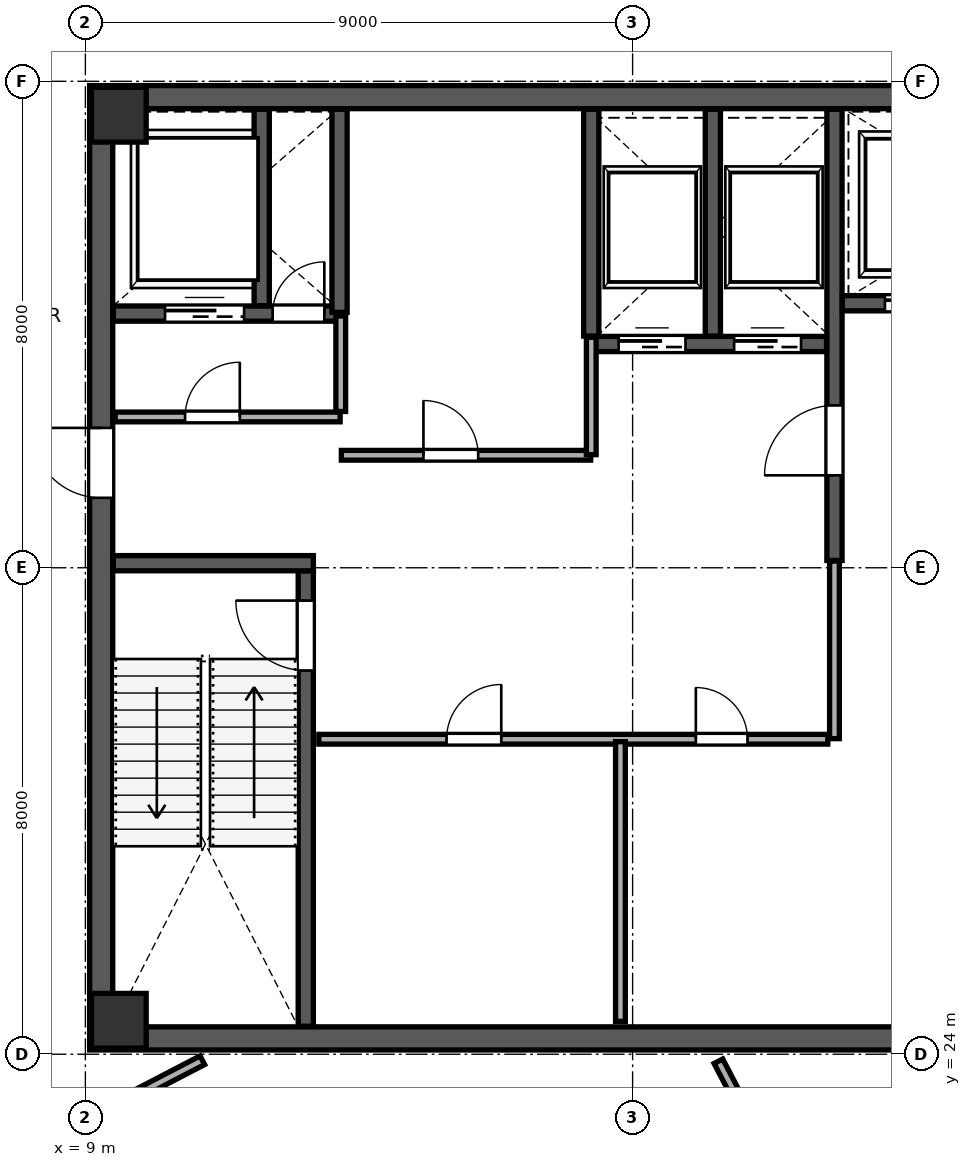
"""IFC4 building model, lengths in metres.
Left out: names, types, materials, properties, quantities, classifications, styles, units other than length and angle.
Written with IfcOpenShell. Run it as: python <this file> out.ifc"""

import sys

from ifc_helpers import new_model, si_unit, direction, frame, frame_2d, origin, origin_2d, place, context, subcontext, project, spatial, rectangle, extrude, source, transform, mapped, element, fill, save


model = new_model("IFC4")
c1 = context("Model", 3, precision=1e-05, world=origin(), true_north=direction((0.0, 1.0)))
c2 = subcontext(c1, "Body", "Model", "MODEL_VIEW")
j1 = project(units=[si_unit("LENGTHUNIT", "METRE"), si_unit("PLANEANGLEUNIT", "RADIAN")], contexts=[c1])
p1 = place(None, origin())
s1 = spatial("IfcSite", under=j1, at=p1, CompositionType="ELEMENT")
p2 = place(p1, origin())
s2 = spatial("IfcBuilding", under=s1, at=p2, CompositionType="ELEMENT")
p3 = place(p2, frame((0.0, 0.0, 328.2)))
s3 = spatial("IfcBuildingStorey", under=s2, at=p3, CompositionType="ELEMENT", Elevation=328.2)
m1 = source(origin(), c2, "Body", "SweptSolid", [
    extrude(rectangle(XDim=0.9, YDim=0.9, at=origin_2d()), origin(), (0.0, 0.0, 1.0), 4.198),
])
for number, where, z_axis, x_axis in (
    (1, (9.55, 24.55, 0.001), (0.0, 0.0, 1.0), (1.0, 0.0, 0.0)),
    (2, (9.55, 39.45, 0.001), (0.0, 0.0, 1.0), (1.0, 0.0, 0.0)),
):
    element("IfcColumn", number, at=place(p3, frame(where, z_axis=z_axis, x_axis=x_axis)), inside=s3, PredefinedType="COLUMN", context=c2, shape_type="MappedRepresentation", body=[
        mapped(m1, transform((0.0, 0.0, 0.0), scale=1.0)),
    ])
p4 = place(p3, frame((9.26, 24.45, 0.0), z_axis=(0.0, 0.0, 1.0), x_axis=(0.0, 1.0, 0.0)))
e3 = element("IfcWall", 3, at=p4, inside=s3, PredefinedType="SHEAR", context=c2, shape_type="SweptSolid", body=[
    extrude(rectangle(XDim=15.1, YDim=0.38, at=frame_2d((7.55, 0.0))), origin(), (0.0, 0.0, 1.0), 3.96),
])
p5 = place(p4, frame((8.7, 0.0, 0.0)))
e4 = element("IfcOpeningElement", 4, at=p5, cuts=e3, PredefinedType="OPENING", context=c2, shape_type="SweptSolid", body=[
    extrude(rectangle(XDim=1.15, YDim=2.2, at=frame_2d((0.575, 1.1))), frame((0.0, 0.2, 0.0), z_axis=(0.0, -1.0, 0.0), x_axis=(1.0, 0.0, 0.0)), (0.0, 0.0, 1.0), 0.4),
])
for number, where, z_axis, x_axis in (
    (5, (9.07, 24.26, 0.0), (0.0, 0.0, 1.0), (1.0, 0.0, 0.0)),
    (6, (9.07, 39.74, 0.0), (0.0, 0.0, 1.0), (1.0, 0.0, 0.0)),
):
    element("IfcWall", number, at=place(p3, frame(where, z_axis=z_axis, x_axis=x_axis)), inside=s3, PredefinedType="SHEAR", context=c2, shape_type="SweptSolid", body=[
        extrude(rectangle(XDim=17.86, YDim=0.38, at=frame_2d((8.93, 0.0))), origin(), (0.0, 0.0, 1.0), 3.96),
    ])
p6 = place(p3, frame((12.625, 24.46, 0.0), z_axis=(0.0, 0.0, 1.0), x_axis=(0.0, 1.0, 0.0)))
e7 = element("IfcWall", 7, at=p6, inside=s3, PredefinedType="SHEAR", context=c2, shape_type="SweptSolid", body=[
    extrude(rectangle(XDim=7.49, YDim=0.25, at=frame_2d((3.745, 0.0))), origin(), (0.0, 0.0, 1.0), 3.96),
])
p7 = place(p6, frame((5.85, 0.0, 0.0)))
e8 = element("IfcOpeningElement", 8, at=p7, cuts=e7, PredefinedType="OPENING", context=c2, shape_type="SweptSolid", body=[
    extrude(rectangle(XDim=1.15, YDim=2.2, at=frame_2d((0.575, 1.1))), frame((0.0, 0.135, 0.0), z_axis=(0.0, -1.0, 0.0), x_axis=(1.0, 0.0, 0.0)), (0.0, 0.0, 1.0), 0.27),
])
p8 = place(p3, frame((9.46, 32.075, 0.0), z_axis=(0.0, 0.0, 1.0), x_axis=(1.0, 0.0, 0.0)))
e9 = element("IfcWall", 9, at=p8, inside=s3, PredefinedType="SHEAR", context=c2, shape_type="SweptSolid", body=[
    extrude(rectangle(XDim=3.29, YDim=0.25, at=frame_2d((1.645, 0.0))), origin(), (0.0, 0.0, 1.0), 3.96),
])
p9 = place(p3, frame((21.32, 32.12, 0.0), z_axis=(0.0, 0.0, 1.0), x_axis=(0.0, 1.0, 0.0)))
e10 = element("IfcWall", 10, at=p9, inside=s3, PredefinedType="SHEAR", context=c2, shape_type="SweptSolid", body=[
    extrude(rectangle(XDim=7.42, YDim=0.25, at=frame_2d((3.71, 0.0))), origin(), (0.0, 0.0, 1.0), 3.96),
])
p10 = place(p9, frame((1.4, 0.0, 0.0)))
e11 = element("IfcOpeningElement", 11, at=p10, cuts=e10, PredefinedType="OPENING", context=c2, shape_type="SweptSolid", body=[
    extrude(rectangle(XDim=1.15, YDim=2.2, at=frame_2d((0.575, 1.1))), frame((0.0, 0.135, 0.0), z_axis=(0.0, -1.0, 0.0), x_axis=(1.0, 0.0, 0.0)), (0.0, 0.0, 1.0), 0.27),
])
p11 = place(p3, frame((9.46, 36.18, 0.0), z_axis=(0.0, 0.0, 1.0), x_axis=(1.0, 0.0, 0.0)))
e12 = element("IfcWall", 12, at=p11, inside=s3, PredefinedType="SHEAR", context=c2, shape_type="SweptSolid", body=[
    extrude(rectangle(XDim=3.79, YDim=0.25, at=frame_2d((1.895, 0.0))), origin(), (0.0, 0.0, 1.0), 3.96),
])
p12 = place(p11, frame((2.62, 0.0, 0.0)))
e13 = element("IfcOpeningElement", 13, at=p12, cuts=e12, PredefinedType="OPENING", context=c2, shape_type="SweptSolid", body=[
    extrude(rectangle(XDim=0.85, YDim=2.1, at=frame_2d((0.425, 1.05))), frame((0.0, 0.135, 0.0), z_axis=(0.0, -1.0, 0.0), x_axis=(1.0, 0.0, 0.0)), (0.0, 0.0, 1.0), 0.27),
])
p13 = place(p11, frame((0.85, 0.0, 0.0)))
e14 = element("IfcOpeningElement", 14, at=p13, cuts=e12, PredefinedType="OPENING", context=c2, shape_type="SweptSolid", body=[
    extrude(rectangle(XDim=1.3, YDim=2.25, at=frame_2d((0.65, 1.125))), frame((0.0, 0.135, 0.0), z_axis=(0.0, -1.0, 0.0), x_axis=(1.0, 0.0, 0.0)), (0.0, 0.0, 1.0), 0.27),
])
p14 = place(p3, frame((11.9, 36.31, 0.0), z_axis=(0.0, 0.0, 1.0), x_axis=(0.0, 1.0, 0.0)))
e15 = element("IfcWall", 15, at=p14, inside=s3, PredefinedType="SHEAR", context=c2, shape_type="SweptSolid", body=[
    extrude(rectangle(XDim=3.23, YDim=0.25, at=frame_2d((1.615, 0.0))), origin(), (0.0, 0.0, 1.0), 3.96),
])
p15 = place(p3, frame((21.45, 36.35, 0.0), z_axis=(0.0, 0.0, 1.0), x_axis=(1.0, 0.0, 0.0)))
e16 = element("IfcWall", 16, at=p15, inside=s3, PredefinedType="SHEAR", context=c2, shape_type="SweptSolid", body=[
    extrude(rectangle(XDim=5.09, YDim=0.25, at=frame_2d((2.545, 0.0))), origin(), (0.0, 0.0, 1.0), 3.96),
])
p16 = place(p15, frame((0.7, 0.0, 0.0)))
e17 = element("IfcOpeningElement", 17, at=p16, cuts=e16, PredefinedType="OPENING", context=c2, shape_type="SweptSolid", body=[
    extrude(rectangle(XDim=1.2, YDim=2.2, at=frame_2d((0.6, 1.1))), frame((0.0, 0.135, 0.0), z_axis=(0.0, -1.0, 0.0), x_axis=(1.0, 0.0, 0.0)), (0.0, 0.0, 1.0), 0.27),
])
p17 = place(p15, frame((3.25, 0.0, 0.0)))
e18 = element("IfcOpeningElement", 18, at=p17, cuts=e16, PredefinedType="OPENING", context=c2, shape_type="SweptSolid", body=[
    extrude(rectangle(XDim=1.2, YDim=2.2, at=frame_2d((0.6, 1.1))), frame((0.0, 0.135, 0.0), z_axis=(0.0, -1.0, 0.0), x_axis=(1.0, 0.0, 0.0)), (0.0, 0.0, 1.0), 0.27),
])
p18 = place(p3, frame((13.18, 36.2, 0.0), z_axis=(0.0, 0.0, 1.0), x_axis=(0.0, 1.0, 0.0)))
e19 = element("IfcWall", 19, at=p18, inside=s3, PredefinedType="SHEAR", context=c2, shape_type="SweptSolid", body=[
    extrude(rectangle(XDim=3.34, YDim=0.25, at=frame_2d((1.67, 0.0))), origin(), (0.0, 0.0, 1.0), 3.96),
])
p19 = place(p3, frame((17.32, 35.68, 0.0), z_axis=(0.0, 0.0, 1.0), x_axis=(1.0, 0.0, 0.0)))
e20 = element("IfcWall", 20, at=p19, inside=s3, PredefinedType="SHEAR", context=c2, shape_type="SweptSolid", body=[
    extrude(rectangle(XDim=3.87, YDim=0.25, at=frame_2d((1.935, 0.0))), origin(), (0.0, 0.0, 1.0), 3.96),
])
p20 = place(p19, frame((0.45, 0.0, 0.0)))
e21 = element("IfcOpeningElement", 21, at=p20, cuts=e20, PredefinedType="OPENING", context=c2, shape_type="SweptSolid", body=[
    extrude(rectangle(XDim=1.1, YDim=2.2, at=frame_2d((0.55, 1.1))), frame((0.0, 0.135, 0.0), z_axis=(0.0, -1.0, 0.0), x_axis=(1.0, 0.0, 0.0)), (0.0, 0.0, 1.0), 0.27),
])
p21 = place(p19, frame((2.35, 0.0, 0.0)))
e22 = element("IfcOpeningElement", 22, at=p21, cuts=e20, PredefinedType="OPENING", context=c2, shape_type="SweptSolid", body=[
    extrude(rectangle(XDim=1.1, YDim=2.2, at=frame_2d((0.55, 1.1))), frame((0.0, 0.135, 0.0), z_axis=(0.0, -1.0, 0.0), x_axis=(1.0, 0.0, 0.0)), (0.0, 0.0, 1.0), 0.27),
])
for number, where, z_axis, x_axis in (
    (23, (17.32, 35.81, 0.0), (0.0, 0.0, 1.0), (0.0, 1.0, 0.0)),
    (24, (19.32, 35.81, 0.0), (0.0, 0.0, 1.0), (0.0, 1.0, 0.0)),
):
    element("IfcWall", number, at=place(p3, frame(where, z_axis=z_axis, x_axis=x_axis)), inside=s3, PredefinedType="SHEAR", context=c2, shape_type="SweptSolid", body=[
        extrude(rectangle(XDim=3.73, YDim=0.25, at=frame_2d((1.865, 0.0))), origin(), (0.0, 0.0, 1.0), 3.96),
    ])
p22 = place(p3, frame((9.49, 34.48, 0.0), z_axis=(0.0, 0.0, 1.0), x_axis=(1.0, 0.0, 0.0)))
e25 = element("IfcWall", 25, at=p22, inside=s3, PredefinedType="PARTITIONING", context=c2, shape_type="SweptSolid", body=[
    extrude(rectangle(XDim=3.7, YDim=0.16, at=frame_2d((1.85, 0.0))), origin(), (0.0, 0.0, 1.0), 3.96),
])
p23 = place(p22, frame((1.15, 0.0, 0.0)))
e26 = element("IfcOpeningElement", 26, at=p23, cuts=e25, PredefinedType="OPENING", context=c2, shape_type="SweptSolid", body=[
    extrude(rectangle(XDim=0.9, YDim=2.15, at=frame_2d((0.45, 1.075))), frame((0.0, 0.09, 0.0), z_axis=(0.0, -1.0, 0.0), x_axis=(1.0, 0.0, 0.0)), (0.0, 0.0, 1.0), 0.18),
])
p24 = place(p3, frame((13.2, 34.57, 0.0), z_axis=(0.0, 0.0, 1.0), x_axis=(0.0, 1.0, 0.0)))
e27 = element("IfcWall", 27, at=p24, inside=s3, PredefinedType="PARTITIONING", context=c2, shape_type="SweptSolid", body=[
    extrude(rectangle(XDim=1.57, YDim=0.16, at=frame_2d((0.785, 0.0))), origin(), (0.0, 0.0, 1.0), 3.96),
])
p25 = place(p3, frame((13.21, 33.85, 0.0), z_axis=(0.0, 0.0, 1.0), x_axis=(1.0, 0.0, 0.0)))
e28 = element("IfcWall", 28, at=p25, inside=s3, PredefinedType="PARTITIONING", context=c2, shape_type="SweptSolid", body=[
    extrude(rectangle(XDim=4.1, YDim=0.16, at=frame_2d((2.05, 0.0))), origin(), (0.0, 0.0, 1.0), 3.96),
])
p26 = place(p25, frame((1.35, 0.0, 0.0)))
e29 = element("IfcOpeningElement", 29, at=p26, cuts=e28, PredefinedType="OPENING", context=c2, shape_type="SweptSolid", body=[
    extrude(rectangle(XDim=0.9, YDim=2.15, at=frame_2d((0.45, 1.075))), frame((0.0, 0.09, 0.0), z_axis=(0.0, -1.0, 0.0), x_axis=(1.0, 0.0, 0.0)), (0.0, 0.0, 1.0), 0.18),
])
p27 = place(p3, frame((17.32, 33.86, 0.0), z_axis=(0.0, 0.0, 1.0), x_axis=(0.0, 1.0, 0.0)))
e30 = element("IfcWall", 30, at=p27, inside=s3, PredefinedType="PARTITIONING", context=c2, shape_type="SweptSolid", body=[
    extrude(rectangle(XDim=1.93, YDim=0.16, at=frame_2d((0.965, 0.0))), origin(), (0.0, 0.0, 1.0), 3.96),
])
p28 = place(p3, frame((12.84, 29.18, 0.0), z_axis=(0.0, 0.0, 1.0), x_axis=(1.0, 0.0, 0.0)))
e31 = element("IfcWall", 31, at=p28, inside=s3, PredefinedType="PARTITIONING", context=c2, shape_type="SweptSolid", body=[
    extrude(rectangle(XDim=8.37, YDim=0.16, at=frame_2d((4.185, 0.0))), origin(), (0.0, 0.0, 1.0), 3.96),
])
p29 = place(p28, frame((2.1, 0.0, 0.0)))
e32 = element("IfcOpeningElement", 32, at=p29, cuts=e31, PredefinedType="OPENING", context=c2, shape_type="SweptSolid", body=[
    extrude(rectangle(XDim=0.9, YDim=2.15, at=frame_2d((0.45, 1.075))), frame((0.0, 0.09, 0.0), z_axis=(0.0, -1.0, 0.0), x_axis=(1.0, 0.0, 0.0)), (0.0, 0.0, 1.0), 0.18),
])
p30 = place(p28, frame((6.2, 0.0, 0.0)))
e33 = element("IfcOpeningElement", 33, at=p30, cuts=e31, PredefinedType="OPENING", context=c2, shape_type="SweptSolid", body=[
    extrude(rectangle(XDim=0.85, YDim=2.1, at=frame_2d((0.425, 1.05))), frame((0.0, 0.09, 0.0), z_axis=(0.0, -1.0, 0.0), x_axis=(1.0, 0.0, 0.0)), (0.0, 0.0, 1.0), 0.18),
])
p31 = place(p3, frame((17.8, 24.54, 0.0), z_axis=(0.0, 0.0, 1.0), x_axis=(0.0, 1.0, 0.0)))
e34 = element("IfcWall", 34, at=p31, inside=s3, PredefinedType="PARTITIONING", context=c2, shape_type="SweptSolid", body=[
    extrude(rectangle(XDim=4.6, YDim=0.16, at=frame_2d((2.3, 0.0))), origin(), (0.0, 0.0, 1.0), 3.96),
])
p32 = place(p3, frame((21.32, 29.19, 0.0), z_axis=(0.0, 0.0, 1.0), x_axis=(0.0, 1.0, 0.0)))
e35 = element("IfcWall", 35, at=p32, inside=s3, PredefinedType="PARTITIONING", context=c2, shape_type="SweptSolid", body=[
    extrude(rectangle(XDim=2.92, YDim=0.16, at=frame_2d((1.46, 0.0))), origin(), (0.0, 0.0, 1.0), 3.96),
])
p33 = place(p3, frame((3.291, 32.566, 0.0), z_axis=(0.0, 0.0, 1.0), x_axis=(0.461745644878, -0.887012378401, 0.0)))
e36 = element("IfcWall", 36, at=p33, inside=s3, PredefinedType="PARTITIONING", context=c2, shape_type="SweptSolid", body=[
    extrude(rectangle(XDim=11.17, YDim=0.16, at=frame_2d((5.585, 0.0))), origin(), (0.0, 0.0, 1.0), 3.96),
])
p34 = place(p33, frame((0.65, 0.0, 0.0)))
e37 = element("IfcOpeningElement", 37, at=p34, cuts=e36, PredefinedType="OPENING", context=c2, shape_type="SweptSolid", body=[
    extrude(rectangle(XDim=0.95, YDim=2.15, at=frame_2d((0.475, 1.075))), frame((0.0, 0.09, 0.0), z_axis=(0.0, -1.0, 0.0), x_axis=(1.0, 0.0, 0.0)), (0.0, 0.0, 1.0), 0.18),
])
p35 = place(p33, frame((2.85, 0.0, 0.0)))
e38 = element("IfcOpeningElement", 38, at=p35, cuts=e36, PredefinedType="OPENING", context=c2, shape_type="SweptSolid", body=[
    extrude(rectangle(XDim=0.95, YDim=2.15, at=frame_2d((0.475, 1.075))), frame((0.0, 0.09, 0.0), z_axis=(0.0, -1.0, 0.0), x_axis=(1.0, 0.0, 0.0)), (0.0, 0.0, 1.0), 0.18),
])
p36 = place(p3, frame((8.503, 22.641, 0.0), z_axis=(0.0, 0.0, 1.0), x_axis=(0.886991176538, 0.461786371328, 0.0)))
e39 = element("IfcWall", 39, at=p36, inside=s3, PredefinedType="PARTITIONING", context=c2, shape_type="SweptSolid", body=[
    extrude(rectangle(XDim=2.729, YDim=0.16, at=frame_2d((1.365, 0.0))), origin(), (0.0, 0.0, 1.0), 3.96),
])
p37 = place(p3, frame((19.411, 23.885, 0.0), z_axis=(0.0, 0.0, 1.0), x_axis=(0.461717603384, -0.887026975196, 0.0)))
e40 = element("IfcWall", 40, at=p37, inside=s3, PredefinedType="PARTITIONING", context=c2, shape_type="SweptSolid", body=[
    extrude(rectangle(XDim=4.466, YDim=0.16, at=frame_2d((2.233, 0.0))), origin(), (0.0, 0.0, 1.0), 3.96),
])
p38 = place(p3, frame((2.284, 37.836, 0.0), z_axis=(0.0, 0.0, 1.0), x_axis=(0.887016973522, 0.461736817553, 0.0)))
e41 = element("IfcWall", 41, at=p38, inside=s3, PredefinedType="PARTITIONING", context=c2, shape_type="SweptSolid", body=[
    extrude(rectangle(XDim=17.11, YDim=0.115, at=frame_2d((8.555, 0.0))), origin(), (0.0, 0.0, 1.0), 3.96),
])
m2 = source(origin(), c2, "Body", "SweptSolid", [
    extrude(rectangle(XDim=1.15, YDim=2.2, at=frame_2d((0.575, 1.1))), frame((0.0, 0.025, 0.0), z_axis=(0.0, -1.0, 0.0), x_axis=(1.0, 0.0, 0.0)), (0.0, 0.0, 1.0), 0.05),
])
p39 = place(p7, origin())
e42 = element("IfcDoor", 42, at=p39, inside=s3, OperationType="SINGLE_SWING_RIGHT", PredefinedType="DOOR", context=c2, shape_type="MappedRepresentation", body=[
    mapped(m2, transform((0.0, 0.0, 0.0), scale=1.0)),
])
fill(e8, e42)
m3 = source(origin(), c2, "Body", "SweptSolid", [
    extrude(rectangle(XDim=1.15, YDim=2.2, at=frame_2d((0.575, 1.1))), frame((0.0, 0.025, 0.0), z_axis=(0.0, -1.0, 0.0), x_axis=(1.0, 0.0, 0.0)), (0.0, 0.0, 1.0), 0.05),
])
p40 = place(p10, origin())
e43 = element("IfcDoor", 43, at=p40, inside=s3, OperationType="SINGLE_SWING_LEFT", PredefinedType="DOOR", context=c2, shape_type="MappedRepresentation", body=[
    mapped(m3, transform((0.0, 0.0, 0.0), scale=1.0)),
])
fill(e11, e43)
p41 = place(p5, origin())
e44 = element("IfcDoor", 44, at=p41, inside=s3, OperationType="SINGLE_SWING_RIGHT", PredefinedType="DOOR", context=c2, shape_type="MappedRepresentation", body=[
    mapped(m3, transform((0.0, 0.0, 0.0), scale=1.0)),
])
fill(e4, e44)
m4 = source(origin(), c2, "Body", "SweptSolid", [
    extrude(rectangle(XDim=0.85, YDim=2.1, at=frame_2d((0.425, 1.05))), frame((0.0, 0.025, 0.0), z_axis=(0.0, -1.0, 0.0), x_axis=(1.0, 0.0, 0.0)), (0.0, 0.0, 1.0), 0.05),
])
p42 = place(p12, origin())
e45 = element("IfcDoor", 45, at=p42, inside=s3, OperationType="SINGLE_SWING_RIGHT", PredefinedType="DOOR", context=c2, shape_type="MappedRepresentation", body=[
    mapped(m4, transform((0.0, 0.0, 0.0), scale=1.0)),
])
fill(e13, e45)
m5 = source(origin(), c2, "Body", "SweptSolid", [
    extrude(rectangle(XDim=1.1, YDim=2.2, at=frame_2d((0.55, 1.1))), frame((0.0, 0.025, 0.0), z_axis=(0.0, -1.0, 0.0), x_axis=(1.0, 0.0, 0.0)), (0.0, 0.0, 1.0), 0.05),
])
p43 = place(p20, origin())
e46 = element("IfcDoor", 46, at=p43, inside=s3, OperationType="SLIDING_TO_LEFT", PredefinedType="DOOR", context=c2, shape_type="MappedRepresentation", body=[
    mapped(m5, transform((0.0, 0.0, 0.0), scale=1.0)),
])
fill(e21, e46)
p44 = place(p21, origin())
e47 = element("IfcDoor", 47, at=p44, inside=s3, OperationType="SLIDING_TO_RIGHT", PredefinedType="DOOR", context=c2, shape_type="MappedRepresentation", body=[
    mapped(m5, transform((0.0, 0.0, 0.0), scale=1.0)),
])
fill(e22, e47)
m6 = source(origin(), c2, "Body", "SweptSolid", [
    extrude(rectangle(XDim=1.2, YDim=2.2, at=frame_2d((0.6, 1.1))), frame((0.0, 0.025, 0.0), z_axis=(0.0, -1.0, 0.0), x_axis=(1.0, 0.0, 0.0)), (0.0, 0.0, 1.0), 0.05),
])
p45 = place(p16, origin())
e48 = element("IfcDoor", 48, at=p45, inside=s3, OperationType="SLIDING_TO_LEFT", PredefinedType="DOOR", context=c2, shape_type="MappedRepresentation", body=[
    mapped(m6, transform((0.0, 0.0, 0.0), scale=1.0)),
])
fill(e17, e48)
m7 = source(origin(), c2, "Body", "SweptSolid", [
    extrude(rectangle(XDim=1.3, YDim=2.25, at=frame_2d((0.65, 1.125))), frame((0.0, 0.025, 0.0), z_axis=(0.0, -1.0, 0.0), x_axis=(1.0, 0.0, 0.0)), (0.0, 0.0, 1.0), 0.05),
])
p46 = place(p13, origin())
e49 = element("IfcDoor", 49, at=p46, inside=s3, OperationType="SLIDING_TO_LEFT", PredefinedType="DOOR", context=c2, shape_type="MappedRepresentation", body=[
    mapped(m7, transform((0.0, 0.0, 0.0), scale=1.0)),
])
fill(e14, e49)
m8 = source(origin(), c2, "Body", "SweptSolid", [
    extrude(rectangle(XDim=0.9, YDim=2.15, at=frame_2d((0.45, 1.075))), frame((0.0, 0.025, 0.0), z_axis=(0.0, -1.0, 0.0), x_axis=(1.0, 0.0, 0.0)), (0.0, 0.0, 1.0), 0.05),
])
p47 = place(p23, origin())
e50 = element("IfcDoor", 50, at=p47, inside=s3, OperationType="SINGLE_SWING_RIGHT", PredefinedType="DOOR", context=c2, shape_type="MappedRepresentation", body=[
    mapped(m8, transform((0.0, 0.0, 0.0), scale=1.0)),
])
fill(e26, e50)
p48 = place(p26, origin())
e51 = element("IfcDoor", 51, at=p48, inside=s3, OperationType="SINGLE_SWING_LEFT", PredefinedType="DOOR", context=c2, shape_type="MappedRepresentation", body=[
    mapped(m8, transform((0.0, 0.0, 0.0), scale=1.0)),
])
fill(e29, e51)
p49 = place(p29, origin())
e52 = element("IfcDoor", 52, at=p49, inside=s3, OperationType="SINGLE_SWING_RIGHT", PredefinedType="DOOR", context=c2, shape_type="MappedRepresentation", body=[
    mapped(m8, transform((0.0, 0.0, 0.0), scale=1.0)),
])
fill(e32, e52)
p50 = place(p30, origin())
e53 = element("IfcDoor", 53, at=p50, inside=s3, OperationType="SINGLE_SWING_LEFT", PredefinedType="DOOR", context=c2, shape_type="MappedRepresentation", body=[
    mapped(m4, transform((0.0, 0.0, 0.0), scale=1.0)),
])
fill(e33, e53)
save(model, sys.argv[1])
